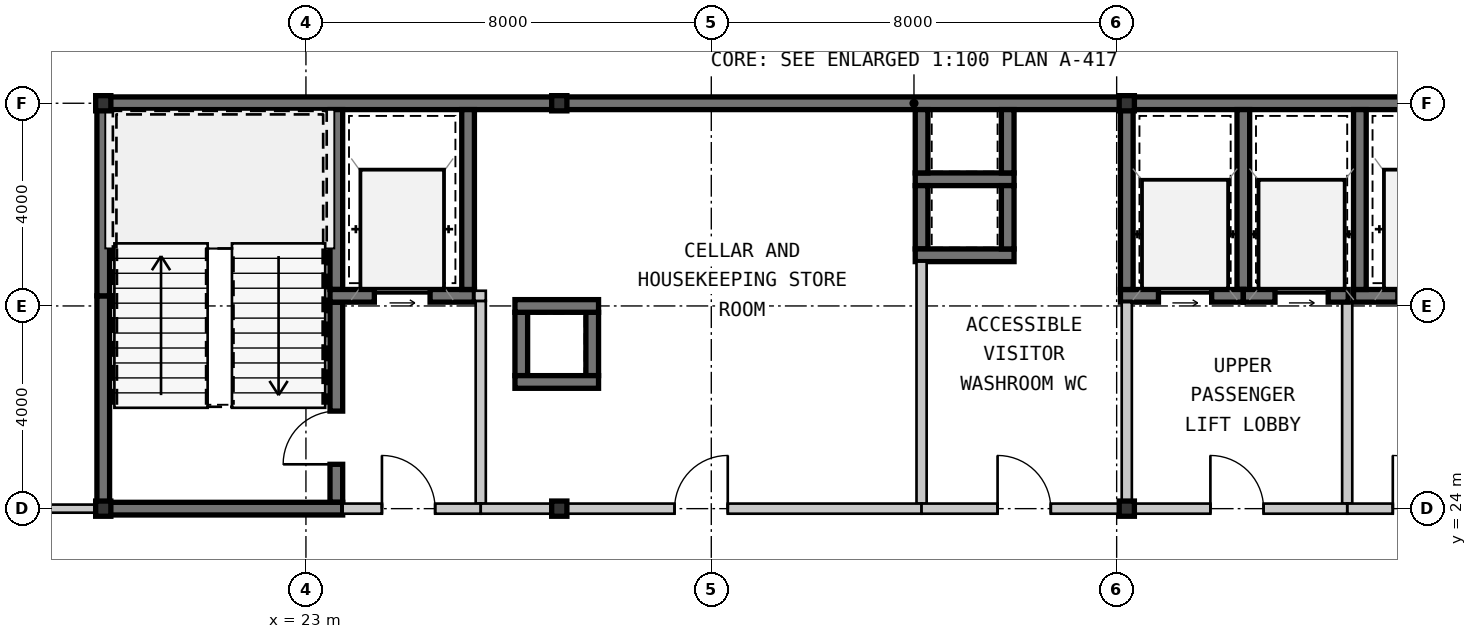
"""IFC4 building model, lengths in metres.
Left out: names, types, materials, properties, quantities, classifications, styles, units other than length and angle.
Written with IfcOpenShell. Run it as: python <this file> out.ifc"""

import sys

from ifc_helpers import new_model, si_unit, direction, frame, frame_2d, origin, origin_2d, place, context, subcontext, project, spatial, rectangle, hollow_rectangle, extrude, source, transform, mapped, element, fill, save


model = new_model("IFC4")
c1 = context("Model", 3, precision=1e-05, world=origin(), true_north=direction((0.0, 1.0)))
c2 = subcontext(c1, "Body", "Model", "MODEL_VIEW")
j1 = project(units=[si_unit("LENGTHUNIT", "METRE"), si_unit("PLANEANGLEUNIT", "RADIAN")], contexts=[c1])
p1 = place(None, origin())
s1 = spatial("IfcSite", under=j1, at=p1, CompositionType="ELEMENT")
p2 = place(p1, origin())
s2 = spatial("IfcBuilding", under=s1, at=p2, CompositionType="ELEMENT")
p3 = place(p2, frame((0.0, 0.0, 220.85)))
s3 = spatial("IfcBuildingStorey", under=s2, at=p3, CompositionType="ELEMENT", Elevation=220.85)
m1 = source(origin(), c2, "Body", "SweptSolid", [
    extrude(hollow_rectangle(XDim=0.3, YDim=0.3, WallThickness=0.012, at=origin_2d()), origin(), (0.0, 0.0, 1.0), 3.15),
])
for number, where, z_axis, x_axis in (
    (1, (19.0, 24.0, 0.0), (0.0, 0.0, 1.0), (1.0, 0.0, 0.0)),
    (2, (28.0, 24.0, 0.0), (0.0, 0.0, 1.0), (1.0, 0.0, 0.0)),
    (3, (39.2, 24.0, 0.0), (0.0, 0.0, 1.0), (1.0, 0.0, 0.0)),
    (4, (19.0, 32.0, 0.0), (0.0, 0.0, 1.0), (1.0, 0.0, 0.0)),
    (5, (28.0, 32.0, 0.0), (0.0, 0.0, 1.0), (1.0, 0.0, 0.0)),
    (6, (39.2, 32.0, 0.0), (0.0, 0.0, 1.0), (1.0, 0.0, 0.0)),
):
    element("IfcColumn", number, at=place(p3, frame(where, z_axis=z_axis, x_axis=x_axis)), inside=s3, PredefinedType="COLUMN", context=c2, shape_type="MappedRepresentation", body=[
        mapped(m1, transform((0.0, 0.0, 0.0), scale=1.0)),
    ])
m2 = source(origin(), c2, "Body", "SweptSolid", [
    extrude(rectangle(XDim=9.125, YDim=0.25, at=frame_2d((4.562, 0.0))), origin(), (0.0, 0.0, 1.0), 2.93),
])
p4 = place(p3, frame((18.875, 32.0, 0.0), z_axis=(0.0, 0.0, 1.0), x_axis=(1.0, 0.0, 0.0)))
e7 = element("IfcWall", 7, at=p4, inside=s3, PredefinedType="SHEAR", context=c2, shape_type="MappedRepresentation", body=[
    mapped(m2, transform((0.0, 0.0, 0.0), scale=1.0)),
])
m3 = source(origin(), c2, "Body", "SweptSolid", [
    extrude(rectangle(XDim=11.2, YDim=0.25, at=frame_2d((5.6, 0.0))), origin(), (0.0, 0.0, 1.0), 2.93),
])
p5 = place(p3, frame((28.0, 32.0, 0.0), z_axis=(0.0, 0.0, 1.0), x_axis=(1.0, 0.0, 0.0)))
e8 = element("IfcWall", 8, at=p5, inside=s3, PredefinedType="SHEAR", context=c2, shape_type="MappedRepresentation", body=[
    mapped(m3, transform((0.0, 0.0, 0.0), scale=1.0)),
])
m4 = source(origin(), c2, "Body", "SweptSolid", [
    extrude(rectangle(XDim=11.925, YDim=0.25, at=frame_2d((5.962, 0.0))), origin(), (0.0, 0.0, 1.0), 2.93),
])
p6 = place(p3, frame((39.2, 32.0, 0.0), z_axis=(0.0, 0.0, 1.0), x_axis=(1.0, 0.0, 0.0)))
e9 = element("IfcWall", 9, at=p6, inside=s3, PredefinedType="SHEAR", context=c2, shape_type="MappedRepresentation", body=[
    mapped(m4, transform((0.0, 0.0, 0.0), scale=1.0)),
])
m5 = source(origin(), c2, "Body", "SweptSolid", [
    extrude(rectangle(XDim=4.075, YDim=0.25, at=frame_2d((2.038, 0.0))), origin(), (0.0, 0.0, 1.0), 2.93),
])
p7 = place(p3, frame((19.0, 24.125, 0.0), z_axis=(0.0, 0.0, 1.0), x_axis=(0.0, 1.0, 0.0)))
e10 = element("IfcWall", 10, at=p7, inside=s3, PredefinedType="SHEAR", context=c2, shape_type="MappedRepresentation", body=[
    mapped(m5, transform((0.0, 0.0, 0.0), scale=1.0)),
])
m6 = source(origin(), c2, "Body", "SweptSolid", [
    extrude(rectangle(XDim=3.675, YDim=0.25, at=frame_2d((1.837, 0.0))), origin(), (0.0, 0.0, 1.0), 2.93),
])
p8 = place(p3, frame((19.0, 28.2, 0.0), z_axis=(0.0, 0.0, 1.0), x_axis=(0.0, 1.0, 0.0)))
e11 = element("IfcWall", 11, at=p8, inside=s3, PredefinedType="SHEAR", context=c2, shape_type="MappedRepresentation", body=[
    mapped(m6, transform((0.0, 0.0, 0.0), scale=1.0)),
])
m7 = source(origin(), c2, "Body", "SweptSolid", [
    extrude(rectangle(XDim=3.55, YDim=0.25, at=frame_2d((1.775, 0.0))), origin(), (0.0, 0.0, 1.0), 2.93),
])
p9 = place(p3, frame((23.6, 28.325, 0.0), z_axis=(0.0, 0.0, 1.0), x_axis=(0.0, 1.0, 0.0)))
e12 = element("IfcWall", 12, at=p9, inside=s3, PredefinedType="SHEAR", context=c2, shape_type="MappedRepresentation", body=[
    mapped(m7, transform((0.0, 0.0, 0.0), scale=1.0)),
])
m8 = source(origin(), c2, "Body", "SweptSolid", [
    extrude(rectangle(XDim=3.95, YDim=0.25, at=frame_2d((1.975, 0.0))), origin(), (0.0, 0.0, 1.0), 2.93),
])
p10 = place(p3, frame((23.6, 24.125, 0.0), z_axis=(0.0, 0.0, 1.0), x_axis=(0.0, 1.0, 0.0)))
e13 = element("IfcWall", 13, at=p10, inside=s3, PredefinedType="SHEAR", context=c2, shape_type="MappedRepresentation", body=[
    mapped(m8, transform((0.0, 0.0, 0.0), scale=1.0)),
])
m9 = source(origin(), c2, "Body", "SweptSolid", [
    extrude(rectangle(XDim=1.05, YDim=2.1, at=frame_2d((0.525, 1.05))), frame((0.0, 0.135, 0.0), z_axis=(0.0, -1.0, 0.0), x_axis=(1.0, 0.0, 0.0)), (0.0, 0.0, 1.0), 0.27),
])
p11 = place(p10, frame((0.75, 0.0, 0.0)))
e14 = element("IfcOpeningElement", 14, at=p11, cuts=e13, PredefinedType="OPENING", context=c2, shape_type="MappedRepresentation", body=[
    mapped(m9, transform((0.0, 0.0, 0.0), scale=1.0)),
])
m10 = source(origin(), c2, "Body", "SweptSolid", [
    extrude(rectangle(XDim=4.85, YDim=0.25, at=frame_2d((2.425, 0.0))), origin(), (0.0, 0.0, 1.0), 2.93),
])
p12 = place(p3, frame((18.875, 24.0, 0.0), z_axis=(0.0, 0.0, 1.0), x_axis=(1.0, 0.0, 0.0)))
e15 = element("IfcWall", 15, at=p12, inside=s3, PredefinedType="SHEAR", context=c2, shape_type="MappedRepresentation", body=[
    mapped(m10, transform((0.0, 0.0, 0.0), scale=1.0)),
])
m11 = source(origin(), c2, "Body", "SweptSolid", [
    extrude(rectangle(XDim=2.85, YDim=0.25, at=frame_2d((1.425, 0.0))), origin(), (0.0, 0.0, 1.0), 2.93),
])
p13 = place(p3, frame((23.475, 28.2, 0.0), z_axis=(0.0, 0.0, 1.0), x_axis=(1.0, 0.0, 0.0)))
e16 = element("IfcWall", 16, at=p13, inside=s3, PredefinedType="SHEAR", context=c2, shape_type="MappedRepresentation", body=[
    mapped(m11, transform((0.0, 0.0, 0.0), scale=1.0)),
])
m12 = source(origin(), c2, "Body", "SweptSolid", [
    extrude(rectangle(XDim=1.1, YDim=2.15, at=frame_2d((0.55, 1.075))), frame((0.0, 0.135, 0.0), z_axis=(0.0, -1.0, 0.0), x_axis=(1.0, 0.0, 0.0)), (0.0, 0.0, 1.0), 0.27),
])
p14 = place(p13, frame((0.875, 0.0, 0.0)))
e17 = element("IfcOpeningElement", 17, at=p14, cuts=e16, PredefinedType="OPENING", context=c2, shape_type="MappedRepresentation", body=[
    mapped(m12, transform((0.0, 0.0, 0.0), scale=1.0)),
])
p15 = place(p3, frame((26.2, 28.325, 0.0), z_axis=(0.0, 0.0, 1.0), x_axis=(0.0, 1.0, 0.0)))
e18 = element("IfcWall", 18, at=p15, inside=s3, PredefinedType="SHEAR", context=c2, shape_type="MappedRepresentation", body=[
    mapped(m7, transform((0.0, 0.0, 0.0), scale=1.0)),
])
m13 = source(origin(), c2, "Body", "SweptSolid", [
    extrude(rectangle(XDim=4.0, YDim=0.2, at=frame_2d((2.0, 0.0))), origin(), (0.0, 0.0, 1.0), 2.93),
])
p16 = place(p3, frame((26.45, 24.1, 0.0), z_axis=(0.0, 0.0, 1.0), x_axis=(0.0, 1.0, 0.0)))
e19 = element("IfcWall", 19, at=p16, inside=s3, PredefinedType="SOLIDWALL", context=c2, shape_type="MappedRepresentation", body=[
    mapped(m13, transform((0.0, 0.0, 0.0), scale=1.0)),
])
m14 = source(origin(), c2, "Body", "SweptSolid", [
    extrude(rectangle(XDim=2.725, YDim=0.2, at=frame_2d((1.362, 0.0))), origin(), (0.0, 0.0, 1.0), 2.47),
])
p17 = place(p3, frame((23.725, 24.0, 0.0), z_axis=(0.0, 0.0, 1.0), x_axis=(1.0, 0.0, 0.0)))
e20 = element("IfcWall", 20, at=p17, inside=s3, PredefinedType="SOLIDWALL", context=c2, shape_type="MappedRepresentation", body=[
    mapped(m14, transform((0.0, 0.0, 0.0), scale=1.0)),
])
m15 = source(origin(), c2, "Body", "SweptSolid", [
    extrude(rectangle(XDim=1.05, YDim=2.1, at=frame_2d((0.525, 1.05))), frame((0.0, 0.11, 0.0), z_axis=(0.0, -1.0, 0.0), x_axis=(1.0, 0.0, 0.0)), (0.0, 0.0, 1.0), 0.22),
])
p18 = place(p17, frame((0.775, 0.0, 0.0)))
e21 = element("IfcOpeningElement", 21, at=p18, cuts=e20, PredefinedType="OPENING", context=c2, shape_type="MappedRepresentation", body=[
    mapped(m15, transform((0.0, 0.0, 0.0), scale=1.0)),
])
p19 = place(p3, frame((43.675, 28.2, 0.0), z_axis=(0.0, 0.0, 1.0), x_axis=(1.0, 0.0, 0.0)))
e22 = element("IfcWall", 22, at=p19, inside=s3, PredefinedType="SHEAR", context=c2, shape_type="MappedRepresentation", body=[
    mapped(m11, transform((0.0, 0.0, 0.0), scale=1.0)),
])
p20 = place(p19, frame((0.875, 0.0, 0.0)))
e23 = element("IfcOpeningElement", 23, at=p20, cuts=e22, PredefinedType="OPENING", context=c2, shape_type="MappedRepresentation", body=[
    mapped(m12, transform((0.0, 0.0, 0.0), scale=1.0)),
])
p21 = place(p3, frame((43.8, 31.875, 0.0), z_axis=(0.0, 0.0, 1.0), x_axis=(0.0, -1.0, 0.0)))
e24 = element("IfcWall", 24, at=p21, inside=s3, PredefinedType="SHEAR", context=c2, shape_type="MappedRepresentation", body=[
    mapped(m7, transform((0.0, 0.0, 0.0), scale=1.0)),
])
m16 = source(origin(), c2, "Body", "SweptSolid", [
    extrude(rectangle(XDim=3.975, YDim=0.2, at=frame_2d((1.987, 0.0))), origin(), (0.0, 0.0, 1.0), 2.93),
])
p22 = place(p3, frame((43.55, 28.075, 0.0), z_axis=(0.0, 0.0, 1.0), x_axis=(0.0, -1.0, 0.0)))
e25 = element("IfcWall", 25, at=p22, inside=s3, PredefinedType="SOLIDWALL", context=c2, shape_type="MappedRepresentation", body=[
    mapped(m16, transform((0.0, 0.0, 0.0), scale=1.0)),
])
m17 = source(origin(), c2, "Body", "SweptSolid", [
    extrude(rectangle(XDim=2.725, YDim=0.2, at=frame_2d((1.362, 0.0))), origin(), (0.0, 0.0, 1.0), 2.397),
])
p23 = place(p3, frame((43.55, 24.0, 0.0), z_axis=(0.0, 0.0, 1.0), x_axis=(1.0, 0.0, 0.0)))
e26 = element("IfcWall", 26, at=p23, inside=s3, PredefinedType="SOLIDWALL", context=c2, shape_type="MappedRepresentation", body=[
    mapped(m17, transform((0.0, 0.0, 0.0), scale=1.0)),
])
p24 = place(p23, frame((0.9, 0.0, 0.0)))
e27 = element("IfcOpeningElement", 27, at=p24, cuts=e26, PredefinedType="OPENING", context=c2, shape_type="MappedRepresentation", body=[
    mapped(m15, transform((0.0, 0.0, 0.0), scale=1.0)),
])
m18 = source(origin(), c2, "Body", "SweptSolid", [
    extrude(rectangle(XDim=1.95, YDim=0.25, at=frame_2d((0.975, 0.0))), origin(), (0.0, 0.0, 1.0), 2.93),
])
p25 = place(p3, frame((35.025, 30.5, 0.0), z_axis=(0.0, 0.0, 1.0), x_axis=(1.0, 0.0, 0.0)))
e28 = element("IfcWall", 28, at=p25, inside=s3, PredefinedType="SHEAR", context=c2, shape_type="MappedRepresentation", body=[
    mapped(m18, transform((0.0, 0.0, 0.0), scale=1.0)),
])
m19 = source(origin(), c2, "Body", "SweptSolid", [
    extrude(rectangle(XDim=1.25, YDim=0.25, at=frame_2d((0.625, 0.0))), origin(), (0.0, 0.0, 1.0), 2.93),
])
for number, where, z_axis, x_axis in (
    (29, (35.15, 31.875, 0.0), (0.0, 0.0, 1.0), (0.0, -1.0, 0.0)),
    (30, (36.85, 30.625, 0.0), (0.0, 0.0, 1.0), (0.0, 1.0, 0.0)),
    (31, (35.15, 30.375, 0.0), (0.0, 0.0, 1.0), (0.0, -1.0, 0.0)),
):
    element("IfcWall", number, at=place(p3, frame(where, z_axis=z_axis, x_axis=x_axis)), inside=s3, PredefinedType="SHEAR", context=c2, shape_type="MappedRepresentation", body=[
        mapped(m19, transform((0.0, 0.0, 0.0), scale=1.0)),
    ])
p26 = place(p3, frame((35.025, 29.0, 0.0), z_axis=(0.0, 0.0, 1.0), x_axis=(1.0, 0.0, 0.0)))
e32 = element("IfcWall", 32, at=p26, inside=s3, PredefinedType="SHEAR", context=c2, shape_type="MappedRepresentation", body=[
    mapped(m18, transform((0.0, 0.0, 0.0), scale=1.0)),
])
for number, where, z_axis, x_axis in (
    (33, (36.85, 29.125, 0.0), (0.0, 0.0, 1.0), (0.0, 1.0, 0.0)),
    (34, (28.65, 26.625, 0.0), (0.0, 0.0, 1.0), (0.0, 1.0, 0.0)),
    (35, (27.25, 27.875, 0.0), (0.0, 0.0, 1.0), (0.0, -1.0, 0.0)),
):
    element("IfcWall", number, at=place(p3, frame(where, z_axis=z_axis, x_axis=x_axis)), inside=s3, PredefinedType="SHEAR", context=c2, shape_type="MappedRepresentation", body=[
        mapped(m19, transform((0.0, 0.0, 0.0), scale=1.0)),
    ])
m20 = source(origin(), c2, "Body", "SweptSolid", [
    extrude(rectangle(XDim=1.65, YDim=0.25, at=frame_2d((0.825, 0.0))), origin(), (0.0, 0.0, 1.0), 2.93),
])
for number, where, z_axis, x_axis in (
    (36, (28.775, 28.0, 0.0), (0.0, 0.0, 1.0), (-1.0, 0.0, 0.0)),
    (37, (27.125, 26.5, 0.0), (0.0, 0.0, 1.0), (1.0, 0.0, 0.0)),
):
    element("IfcWall", number, at=place(p3, frame(where, z_axis=z_axis, x_axis=x_axis)), inside=s3, PredefinedType="SHEAR", context=c2, shape_type="MappedRepresentation", body=[
        mapped(m20, transform((0.0, 0.0, 0.0), scale=1.0)),
    ])
p27 = place(p3, frame((41.5, 28.325, 0.0), z_axis=(0.0, 0.0, 1.0), x_axis=(0.0, 1.0, 0.0)))
e38 = element("IfcWall", 38, at=p27, inside=s3, PredefinedType="SHEAR", context=c2, shape_type="MappedRepresentation", body=[
    mapped(m7, transform((0.0, 0.0, 0.0), scale=1.0)),
])
m21 = source(origin(), c2, "Body", "SweptSolid", [
    extrude(rectangle(XDim=2.425, YDim=0.25, at=frame_2d((1.212, 0.0))), origin(), (0.0, 0.0, 1.0), 2.93),
])
p28 = place(p3, frame((39.075, 28.2, 0.0), z_axis=(0.0, 0.0, 1.0), x_axis=(1.0, 0.0, 0.0)))
e39 = element("IfcWall", 39, at=p28, inside=s3, PredefinedType="SHEAR", context=c2, shape_type="MappedRepresentation", body=[
    mapped(m21, transform((0.0, 0.0, 0.0), scale=1.0)),
])
m22 = source(origin(), c2, "Body", "SweptSolid", [
    extrude(rectangle(XDim=1.05, YDim=2.15, at=frame_2d((0.525, 1.075))), frame((0.0, 0.135, 0.0), z_axis=(0.0, -1.0, 0.0), x_axis=(1.0, 0.0, 0.0)), (0.0, 0.0, 1.0), 0.27),
])
p29 = place(p28, frame((0.75, 0.0, 0.0)))
e40 = element("IfcOpeningElement", 40, at=p29, cuts=e39, PredefinedType="OPENING", context=c2, shape_type="MappedRepresentation", body=[
    mapped(m22, transform((0.0, 0.0, 0.0), scale=1.0)),
])
p30 = place(p3, frame((39.2, 31.875, 0.0), z_axis=(0.0, 0.0, 1.0), x_axis=(0.0, -1.0, 0.0)))
e41 = element("IfcWall", 41, at=p30, inside=s3, PredefinedType="SHEAR", context=c2, shape_type="MappedRepresentation", body=[
    mapped(m7, transform((0.0, 0.0, 0.0), scale=1.0)),
])
m23 = source(origin(), c2, "Body", "SweptSolid", [
    extrude(rectangle(XDim=2.07, YDim=0.25, at=frame_2d((1.035, 0.0))), origin(), (0.0, 0.0, 1.0), 2.93),
])
p31 = place(p3, frame((41.5, 28.2, 0.0), z_axis=(0.0, 0.0, 1.0), x_axis=(1.0, 0.0, 0.0)))
e42 = element("IfcWall", 42, at=p31, inside=s3, PredefinedType="SHEAR", context=c2, shape_type="MappedRepresentation", body=[
    mapped(m23, transform((0.0, 0.0, 0.0), scale=1.0)),
])
p32 = place(p31, frame((0.625, 0.0, 0.0)))
e43 = element("IfcOpeningElement", 43, at=p32, cuts=e42, PredefinedType="OPENING", context=c2, shape_type="MappedRepresentation", body=[
    mapped(m22, transform((0.0, 0.0, 0.0), scale=1.0)),
])
m24 = source(origin(), c2, "Body", "SweptSolid", [
    extrude(rectangle(XDim=3.975, YDim=0.2, at=frame_2d((1.987, 0.0))), origin(), (0.0, 0.0, 1.0), 2.47),
])
p33 = place(p3, frame((39.2, 24.1, 0.0), z_axis=(0.0, 0.0, 1.0), x_axis=(0.0, 1.0, 0.0)))
e44 = element("IfcWall", 44, at=p33, inside=s3, PredefinedType="SOLIDWALL", context=c2, shape_type="MappedRepresentation", body=[
    mapped(m24, transform((0.0, 0.0, 0.0), scale=1.0)),
])
m25 = source(origin(), c2, "Body", "SweptSolid", [
    extrude(rectangle(XDim=4.35, YDim=0.2, at=frame_2d((2.175, 0.0))), origin(), (0.0, 0.0, 1.0), 2.397),
])
p34 = place(p3, frame((43.55, 24.0, 0.0), z_axis=(0.0, 0.0, 1.0), x_axis=(-1.0, 0.0, 0.0)))
e45 = element("IfcWall", 45, at=p34, inside=s3, PredefinedType="SOLIDWALL", context=c2, shape_type="MappedRepresentation", body=[
    mapped(m25, transform((0.0, 0.0, 0.0), scale=1.0)),
])
p35 = place(p34, frame((1.65, 0.0, 0.0)))
e46 = element("IfcOpeningElement", 46, at=p35, cuts=e45, PredefinedType="OPENING", context=c2, shape_type="MappedRepresentation", body=[
    mapped(m15, transform((0.0, 0.0, 0.0), scale=1.0)),
])
m26 = source(origin(), c2, "Body", "SweptSolid", [
    extrude(rectangle(XDim=4.775, YDim=0.2, at=frame_2d((2.387, 0.0))), origin(), (0.0, 0.0, 1.0), 2.93),
])
p36 = place(p3, frame((35.15, 28.875, 0.0), z_axis=(0.0, 0.0, 1.0), x_axis=(0.0, -1.0, 0.0)))
e47 = element("IfcWall", 47, at=p36, inside=s3, PredefinedType="SOLIDWALL", context=c2, shape_type="MappedRepresentation", body=[
    mapped(m26, transform((0.0, 0.0, 0.0), scale=1.0)),
])
m27 = source(origin(), c2, "Body", "SweptSolid", [
    extrude(rectangle(XDim=8.7, YDim=0.2, at=frame_2d((4.35, 0.0))), origin(), (0.0, 0.0, 1.0), 2.47),
])
p37 = place(p3, frame((35.15, 24.0, 0.0), z_axis=(0.0, 0.0, 1.0), x_axis=(-1.0, 0.0, 0.0)))
e48 = element("IfcWall", 48, at=p37, inside=s3, PredefinedType="SOLIDWALL", context=c2, shape_type="MappedRepresentation", body=[
    mapped(m27, transform((0.0, 0.0, 0.0), scale=1.0)),
])
p38 = place(p37, frame((3.825, 0.0, 0.0)))
e49 = element("IfcOpeningElement", 49, at=p38, cuts=e48, PredefinedType="OPENING", context=c2, shape_type="MappedRepresentation", body=[
    mapped(m15, transform((0.0, 0.0, 0.0), scale=1.0)),
])
m28 = source(origin(), c2, "Body", "SweptSolid", [
    extrude(rectangle(XDim=4.05, YDim=0.2, at=frame_2d((2.025, 0.0))), origin(), (0.0, 0.0, 1.0), 2.47),
])
p39 = place(p3, frame((39.2, 24.0, 0.0), z_axis=(0.0, 0.0, 1.0), x_axis=(-1.0, 0.0, 0.0)))
e50 = element("IfcWall", 50, at=p39, inside=s3, PredefinedType="SOLIDWALL", context=c2, shape_type="MappedRepresentation", body=[
    mapped(m28, transform((0.0, 0.0, 0.0), scale=1.0)),
])
p40 = place(p39, frame((1.5, 0.0, 0.0)))
e51 = element("IfcOpeningElement", 51, at=p40, cuts=e50, PredefinedType="OPENING", context=c2, shape_type="MappedRepresentation", body=[
    mapped(m15, transform((0.0, 0.0, 0.0), scale=1.0)),
])
m29 = source(origin(), c2, "Body", "SweptSolid", [
    extrude(rectangle(XDim=6.032, YDim=0.16, at=frame_2d((3.016, 0.0))), origin(), (0.0, 0.0, 1.0), 2.93),
])
p41 = place(p3, frame((12.843, 24.0, 0.0), z_axis=(0.0, 0.0, 1.0), x_axis=(1.0, 0.0, 0.0)))
e52 = element("IfcWall", 52, at=p41, inside=s3, PredefinedType="PARTITIONING", context=c2, shape_type="MappedRepresentation", body=[
    mapped(m29, transform((0.0, 0.0, 0.0), scale=1.0)),
])
m30 = source(origin(), c2, "Body", "SweptSolid", [
    extrude(rectangle(XDim=0.92, YDim=2.1, at=frame_2d((0.46, 1.05))), frame((0.0, 0.09, 0.0), z_axis=(0.0, -1.0, 0.0), x_axis=(1.0, 0.0, 0.0)), (0.0, 0.0, 1.0), 0.18),
])
p42 = place(p41, frame((2.608, 0.0, 0.0)))
e53 = element("IfcOpeningElement", 53, at=p42, cuts=e52, PredefinedType="OPENING", context=c2, shape_type="MappedRepresentation", body=[
    mapped(m30, transform((0.0, 0.0, 0.0), scale=1.0)),
])
m31 = source(origin(), c2, "Body", "SweptSolid", [
    extrude(rectangle(XDim=0.225, YDim=0.2, at=frame_2d((0.113, 0.0))), origin(), (0.0, 0.0, 1.0), 2.93),
])
p43 = place(p3, frame((26.325, 28.2, 0.0), z_axis=(0.0, 0.0, 1.0), x_axis=(1.0, 0.0, 0.0)))
e54 = element("IfcWall", 54, at=p43, inside=s3, PredefinedType="SOLIDWALL", context=c2, shape_type="MappedRepresentation", body=[
    mapped(m31, transform((0.0, 0.0, 0.0), scale=1.0)),
])
m32 = source(origin(), c2, "Body", "SweptSolid", [
    extrude(rectangle(XDim=1.05, YDim=2.1, at=frame_2d((0.525, 1.05))), frame((0.0, 0.025, 0.0), z_axis=(0.0, -1.0, 0.0), x_axis=(1.0, 0.0, 0.0)), (0.0, 0.0, 1.0), 0.05),
])
p44 = place(p11, origin())
e55 = element("IfcDoor", 55, at=p44, inside=s3, OperationType="SINGLE_SWING_LEFT", PredefinedType="DOOR", context=c2, shape_type="MappedRepresentation", body=[
    mapped(m32, transform((0.0, 0.0, 0.0), scale=1.0)),
])
fill(e14, e55)
m33 = source(origin(), c2, "Body", "SweptSolid", [
    extrude(rectangle(XDim=1.1, YDim=2.15, at=frame_2d((0.55, 1.075))), frame((0.0, 0.025, 0.0), z_axis=(0.0, -1.0, 0.0), x_axis=(1.0, 0.0, 0.0)), (0.0, 0.0, 1.0), 0.05),
])
p45 = place(p14, origin())
e56 = element("IfcDoor", 56, at=p45, inside=s3, OperationType="SLIDING_TO_LEFT", PredefinedType="DOOR", context=c2, shape_type="MappedRepresentation", body=[
    mapped(m33, transform((0.0, 0.0, 0.0), scale=1.0)),
])
fill(e17, e56)
p46 = place(p18, origin())
e57 = element("IfcDoor", 57, at=p46, inside=s3, OperationType="SINGLE_SWING_LEFT", PredefinedType="DOOR", context=c2, shape_type="MappedRepresentation", body=[
    mapped(m32, transform((0.0, 0.0, 0.0), scale=1.0)),
])
fill(e21, e57)
p47 = place(p24, origin())
e58 = element("IfcDoor", 58, at=p47, inside=s3, OperationType="SINGLE_SWING_LEFT", PredefinedType="DOOR", context=c2, shape_type="MappedRepresentation", body=[
    mapped(m32, transform((0.0, 0.0, 0.0), scale=1.0)),
])
fill(e27, e58)
m34 = source(origin(), c2, "Body", "SweptSolid", [
    extrude(rectangle(XDim=1.05, YDim=2.15, at=frame_2d((0.525, 1.075))), frame((0.0, 0.025, 0.0), z_axis=(0.0, -1.0, 0.0), x_axis=(1.0, 0.0, 0.0)), (0.0, 0.0, 1.0), 0.05),
])
p48 = place(p29, origin())
e59 = element("IfcDoor", 59, at=p48, inside=s3, OperationType="SLIDING_TO_LEFT", PredefinedType="DOOR", context=c2, shape_type="MappedRepresentation", body=[
    mapped(m34, transform((0.0, 0.0, 0.0), scale=1.0)),
])
fill(e40, e59)
p49 = place(p32, origin())
e60 = element("IfcDoor", 60, at=p49, inside=s3, OperationType="SLIDING_TO_LEFT", PredefinedType="DOOR", context=c2, shape_type="MappedRepresentation", body=[
    mapped(m34, transform((0.0, 0.0, 0.0), scale=1.0)),
])
fill(e43, e60)
p50 = place(p35, frame((1.05, 0.0, 0.0), z_axis=(0.0, 0.0, 1.0), x_axis=(-1.0, 0.0, 0.0)))
e61 = element("IfcDoor", 61, at=p50, inside=s3, OperationType="SINGLE_SWING_LEFT", PredefinedType="DOOR", context=c2, shape_type="MappedRepresentation", body=[
    mapped(m32, transform((0.0, 0.0, 0.0), scale=1.0)),
])
fill(e46, e61)
p51 = place(p38, frame((1.05, 0.0, 0.0), z_axis=(0.0, 0.0, 1.0), x_axis=(-1.0, 0.0, 0.0)))
e62 = element("IfcDoor", 62, at=p51, inside=s3, OperationType="SINGLE_SWING_RIGHT", PredefinedType="DOOR", context=c2, shape_type="MappedRepresentation", body=[
    mapped(m32, transform((0.0, 0.0, 0.0), scale=1.0)),
])
fill(e49, e62)
p52 = place(p40, frame((1.05, 0.0, 0.0), z_axis=(0.0, 0.0, 1.0), x_axis=(-1.0, 0.0, 0.0)))
e63 = element("IfcDoor", 63, at=p52, inside=s3, OperationType="SINGLE_SWING_LEFT", PredefinedType="DOOR", context=c2, shape_type="MappedRepresentation", body=[
    mapped(m32, transform((0.0, 0.0, 0.0), scale=1.0)),
])
fill(e51, e63)
save(model, sys.argv[1])
